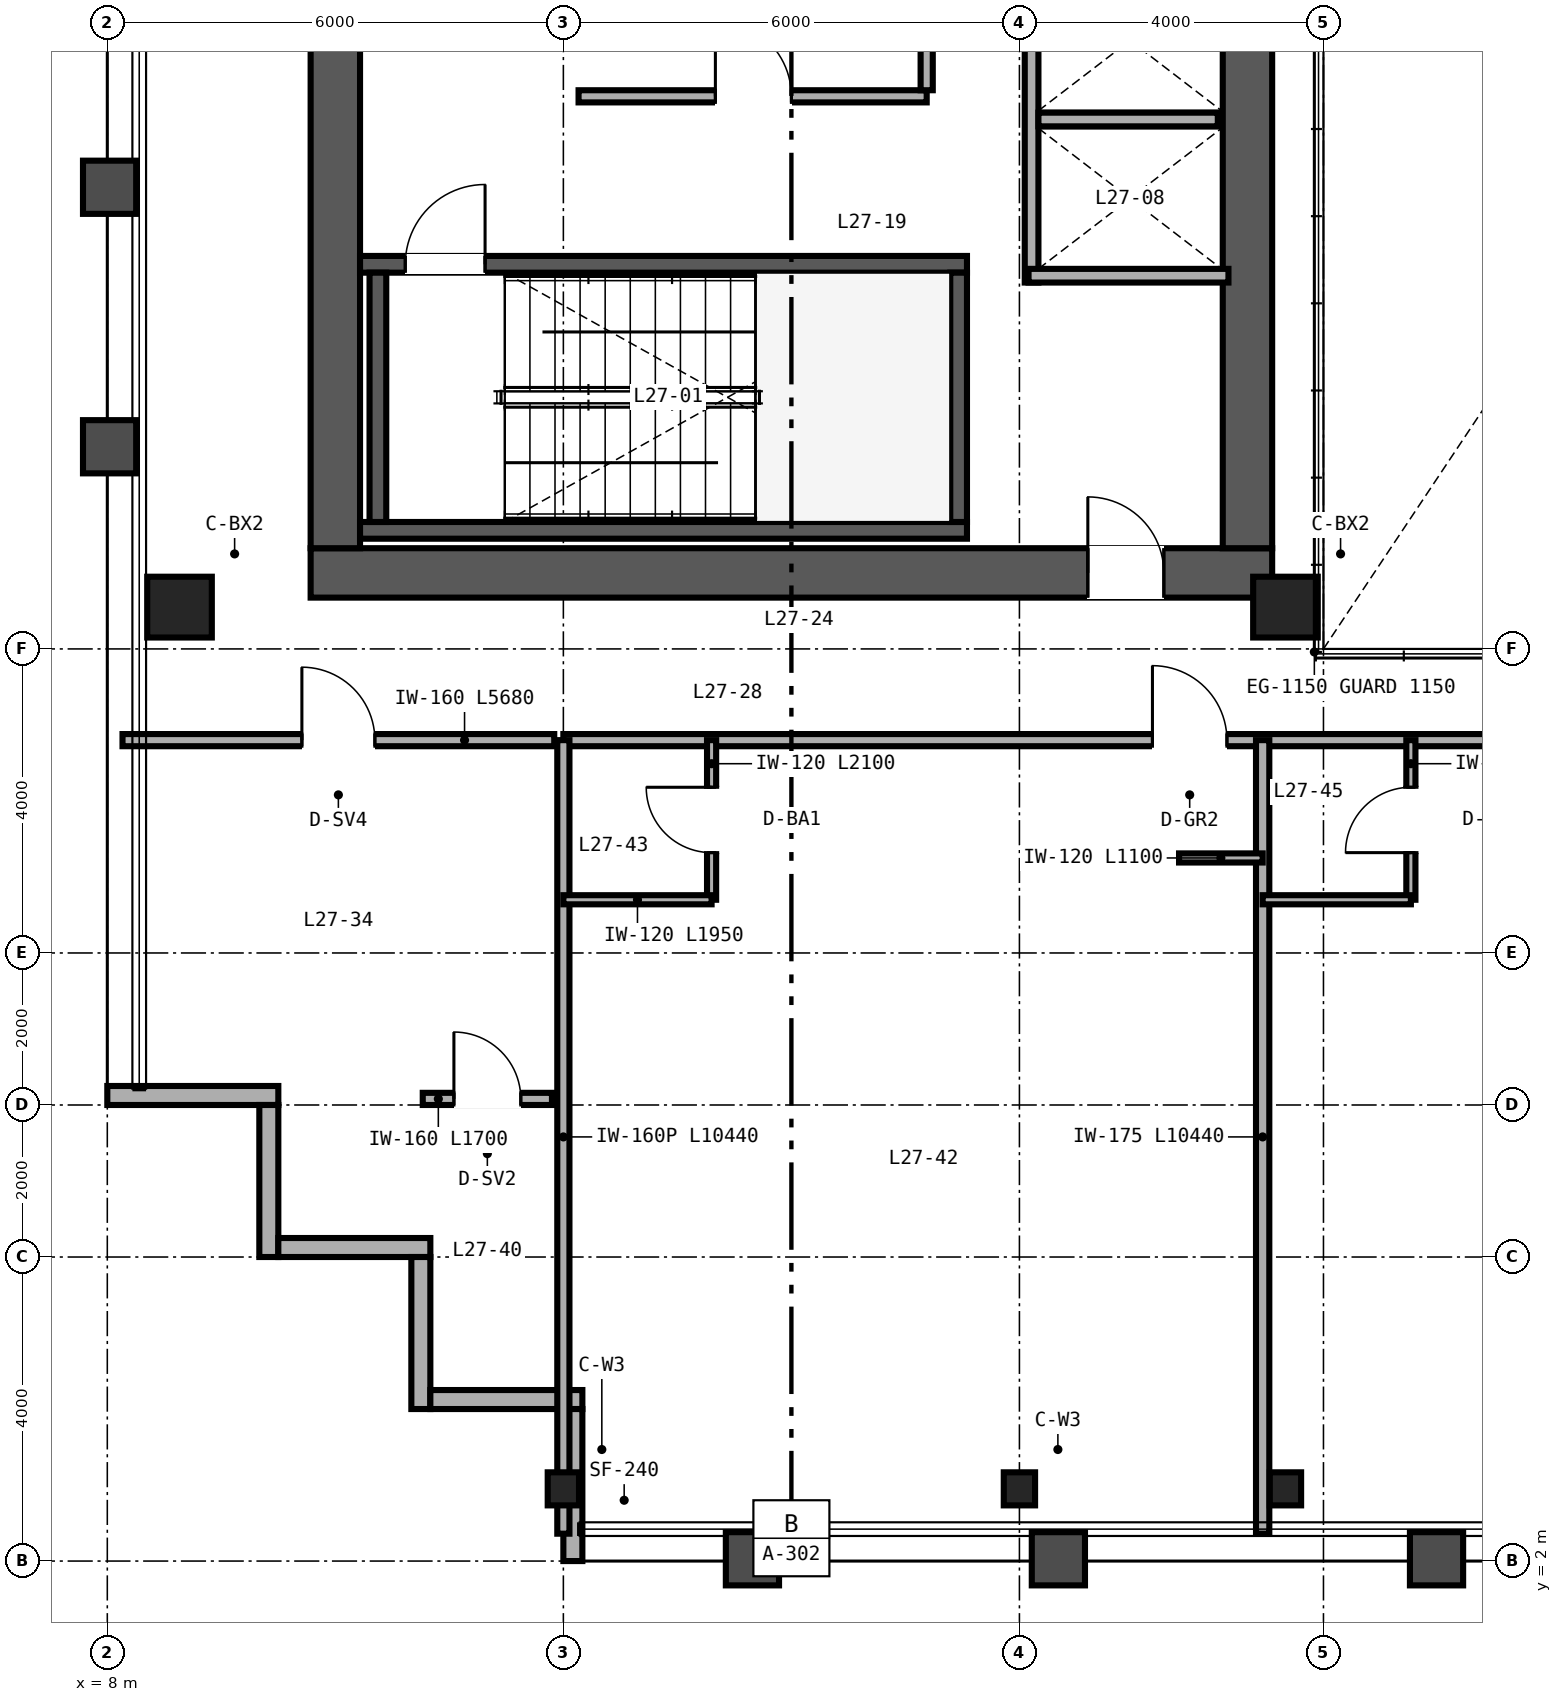
"""IFC4 building model, lengths in metres.
Left out: names, types, materials, properties, quantities, classifications, styles, units other than length and angle.
Written with IfcOpenShell. Run it as: python <this file> out.ifc"""

import sys

from ifc_helpers import new_model, si_unit, direction, frame, frame_2d, origin, origin_2d, place, context, subcontext, project, spatial, rectangle, hollow_rectangle, i_section, extrude, source, transform, mapped, element, fill, save


model = new_model("IFC4")
c1 = context("Model", 3, precision=1e-05, world=origin(), true_north=direction((0.0, 1.0)))
c2 = subcontext(c1, "Body", "Model", "MODEL_VIEW")
j1 = project(units=[si_unit("LENGTHUNIT", "METRE"), si_unit("PLANEANGLEUNIT", "RADIAN")], contexts=[c1])
p1 = place(None, origin())
s1 = spatial("IfcSite", under=j1, at=p1, CompositionType="ELEMENT")
p2 = place(p1, origin())
s2 = spatial("IfcBuilding", under=s1, at=p2, CompositionType="ELEMENT")
p3 = place(p2, frame((0.0, 0.0, 111.6)))
s3 = spatial("IfcBuildingStorey", under=s2, at=p3, CompositionType="ELEMENT", Elevation=111.6)
p4 = place(p3, frame((10.675, 15.0, 0.0), z_axis=(0.0, 0.0, 1.0), x_axis=(1.0, 0.0, 0.0)))
e1 = element("IfcWall", 1, at=p4, inside=s3, PredefinedType="SHEAR", context=c2, shape_type="SweptSolid", body=[
    extrude(rectangle(XDim=12.65, YDim=0.65, at=frame_2d((6.325, 0.0))), origin(), (0.0, 0.0, 1.0), 3.36),
])
p5 = place(p4, frame((10.225, 0.0, 0.0)))
e2 = element("IfcOpeningElement", 2, at=p5, cuts=e1, PredefinedType="OPENING", context=c2, shape_type="SweptSolid", body=[
    extrude(rectangle(XDim=1.0, YDim=2.15, at=frame_2d((0.5, 1.075))), frame((0.0, 0.335, 0.0), z_axis=(0.0, -1.0, 0.0), x_axis=(1.0, 0.0, 0.0)), (0.0, 0.0, 1.0), 0.67),
])
for number, where, z_axis, x_axis in (
    (3, (11.0, 15.325, 0.0), (0.0, 0.0, 1.0), (0.0, 1.0, 0.0)),
    (4, (23.0, 15.325, 0.0), (0.0, 0.0, 1.0), (0.0, 1.0, 0.0)),
):
    element("IfcWall", number, at=place(p3, frame(where, z_axis=z_axis, x_axis=x_axis)), inside=s3, PredefinedType="SHEAR", context=c2, shape_type="SweptSolid", body=[
        extrude(rectangle(XDim=21.35, YDim=0.65, at=frame_2d((10.675, 0.0))), origin(), (0.0, 0.0, 1.0), 3.36),
    ])
p6 = place(p3, frame((11.325, 15.56, 0.0), z_axis=(0.0, 0.0, 1.0), x_axis=(1.0, 0.0, 0.0)))
e5 = element("IfcWall", 5, at=p6, inside=s3, PredefinedType="SHEAR", context=c2, shape_type="SweptSolid", body=[
    extrude(rectangle(XDim=7.985, YDim=0.22, at=frame_2d((3.993, 0.0))), origin(), (0.0, 0.0, 1.0), 3.4),
])
p7 = place(p3, frame((11.325, 19.06, 0.0), z_axis=(0.0, 0.0, 1.0), x_axis=(1.0, 0.0, 0.0)))
e6 = element("IfcWall", 6, at=p7, inside=s3, PredefinedType="SHEAR", context=c2, shape_type="SweptSolid", body=[
    extrude(rectangle(XDim=7.985, YDim=0.22, at=frame_2d((3.993, 0.0))), origin(), (0.0, 0.0, 1.0), 3.4),
])
p8 = place(p7, frame((0.595, 0.0, 0.0)))
e7 = element("IfcOpeningElement", 7, at=p8, cuts=e6, PredefinedType="OPENING", context=c2, shape_type="SweptSolid", body=[
    extrude(rectangle(XDim=1.05, YDim=2.15, at=frame_2d((0.525, 1.075))), frame((0.0, 0.12, 0.0), z_axis=(0.0, -1.0, 0.0), x_axis=(1.0, 0.0, 0.0)), (0.0, 0.0, 1.0), 0.24),
])
for number, where, z_axis, x_axis in (
    (8, (11.56, 15.67, 0.0), (0.0, 0.0, 1.0), (0.0, 1.0, 0.0)),
    (9, (19.2, 15.67, 0.0), (0.0, 0.0, 1.0), (0.0, 1.0, 0.0)),
):
    element("IfcWall", number, at=place(p3, frame(where, z_axis=z_axis, x_axis=x_axis)), inside=s3, PredefinedType="SHEAR", context=c2, shape_type="SweptSolid", body=[
        extrude(rectangle(XDim=3.28, YDim=0.22, at=frame_2d((1.64, 0.0))), origin(), (0.0, 0.0, 1.0), 3.4),
    ])
m1 = source(origin(), c2, "Body", "SweptSolid", [
    extrude(hollow_rectangle(XDim=0.85, YDim=0.8, WallThickness=0.032, at=origin_2d()), origin(), (0.0, 0.0, 1.0), 3.36),
])
for number, where, z_axis, x_axis in (
    (10, (8.95, 14.55, 0.0), (0.0, 0.0, 1.0), (1.0, 0.0, 0.0)),
    (11, (23.5, 14.55, 0.0), (0.0, 0.0, 1.0), (1.0, 0.0, 0.0)),
):
    element("IfcColumn", number, at=place(p3, frame(where, z_axis=z_axis, x_axis=x_axis)), inside=s3, PredefinedType="COLUMN", context=c2, shape_type="MappedRepresentation", body=[
        mapped(m1, transform((0.0, 0.0, 0.0), scale=1.0)),
    ])
m2 = source(origin(), c2, "Body", "SweptSolid", [
    extrude(i_section(OverallWidth=0.412, OverallDepth=0.435, WebThickness=0.036, FlangeThickness=0.057, FilletRadius=0.025, at=origin_2d()), origin(), (0.0, 0.0, 1.0), 3.36),
])
for number, where, z_axis, x_axis in (
    (12, (14.0, 2.95, 0.0), (0.0, 0.0, 1.0), (1.0, 0.0, 0.0)),
    (13, (20.0, 2.95, 0.0), (0.0, 0.0, 1.0), (1.0, 0.0, 0.0)),
    (14, (23.5, 2.95, 0.0), (0.0, 0.0, 1.0), (1.0, 0.0, 0.0)),
):
    element("IfcColumn", number, at=place(p3, frame(where, z_axis=z_axis, x_axis=x_axis)), inside=s3, PredefinedType="COLUMN", context=c2, shape_type="MappedRepresentation", body=[
        mapped(m2, transform((0.0, 0.0, 0.0), scale=1.0)),
    ])
p9 = place(p3, frame((8.0, 8.125, 0.0), z_axis=(0.0, 0.0, 1.0), x_axis=(1.0, 0.0, 0.0)))
e15 = element("IfcWall", 15, at=p9, inside=s3, PredefinedType="SOLIDWALL", context=c2, shape_type="SweptSolid", body=[
    extrude(rectangle(XDim=2.25, YDim=0.25, at=frame_2d((1.125, 0.0))), origin(), (0.0, 0.0, 1.0), 3.36),
])
for number, where, z_axis, x_axis in (
    (16, (10.125, 8.0, 0.0), (0.0, 0.0, 1.0), (0.0, -1.0, 0.0)),
    (17, (10.25, 6.125, 0.0), (0.0, 0.0, 1.0), (1.0, 0.0, 0.0)),
    (18, (12.125, 6.0, 0.0), (0.0, 0.0, 1.0), (0.0, -1.0, 0.0)),
    (19, (12.25, 4.125, 0.0), (0.0, 0.0, 1.0), (1.0, 0.0, 0.0)),
):
    element("IfcWall", number, at=place(p3, frame(where, z_axis=z_axis, x_axis=x_axis)), inside=s3, PredefinedType="SOLIDWALL", context=c2, shape_type="SweptSolid", body=[
        extrude(rectangle(XDim=2.0, YDim=0.25, at=frame_2d((1.0, 0.0))), origin(), (0.0, 0.0, 1.0), 3.36),
    ])
p10 = place(p3, frame((14.125, 4.0, 0.0), z_axis=(0.0, 0.0, 1.0), x_axis=(0.0, -1.0, 0.0)))
e20 = element("IfcWall", 20, at=p10, inside=s3, PredefinedType="SOLIDWALL", context=c2, shape_type="SweptSolid", body=[
    extrude(rectangle(XDim=2.0, YDim=0.25, at=frame_2d((1.0, 0.0))), origin(), (0.0, 0.0, 1.0), 2.667),
])
p11 = place(p3, frame((20.16, 18.82, 0.0), z_axis=(0.0, 0.0, 1.0), x_axis=(0.0, 1.0, 0.0)))
e21 = element("IfcWall", 21, at=p11, inside=s3, PredefinedType="SOLIDWALL", context=c2, shape_type="SweptSolid", body=[
    extrude(rectangle(XDim=6.32, YDim=0.18, at=frame_2d((3.16, 0.0))), origin(), (0.0, 0.0, 1.0), 2.36),
])
p12 = place(p3, frame((20.12, 18.91, 0.0), z_axis=(0.0, 0.0, 1.0), x_axis=(1.0, 0.0, 0.0)))
e22 = element("IfcWall", 22, at=p12, inside=s3, PredefinedType="SOLIDWALL", context=c2, shape_type="SweptSolid", body=[
    extrude(rectangle(XDim=2.63, YDim=0.18, at=frame_2d((1.315, 0.0))), origin(), (0.0, 0.0, 1.0), 3.36),
])
p13 = place(p3, frame((20.25, 20.965, 0.0), z_axis=(0.0, 0.0, 1.0), x_axis=(1.0, 0.0, 0.0)))
e23 = element("IfcWall", 23, at=p13, inside=s3, PredefinedType="SOLIDWALL", context=c2, shape_type="SweptSolid", body=[
    extrude(rectangle(XDim=2.36, YDim=0.18, at=frame_2d((1.18, 0.0))), origin(), (0.0, 0.0, 1.0), 2.36),
])
p14 = place(p3, frame((14.2, 21.27, 0.0), z_axis=(0.0, 0.0, 1.0), x_axis=(1.0, 0.0, 0.0)))
e24 = element("IfcWall", 24, at=p14, inside=s3, PredefinedType="PARTITIONING", context=c2, shape_type="SweptSolid", body=[
    extrude(rectangle(XDim=4.58, YDim=0.16, at=frame_2d((2.29, 0.0))), origin(), (0.0, 0.0, 1.0), 3.36),
])
p15 = place(p14, frame((1.8, 0.0, 0.0)))
e25 = element("IfcOpeningElement", 25, at=p15, cuts=e24, PredefinedType="OPENING", context=c2, shape_type="SweptSolid", body=[
    extrude(rectangle(XDim=1.0, YDim=2.15, at=frame_2d((0.5, 1.075))), frame((0.0, 0.09, 0.0), z_axis=(0.0, -1.0, 0.0), x_axis=(1.0, 0.0, 0.0)), (0.0, 0.0, 1.0), 0.18),
])
p16 = place(p3, frame((18.78, 21.35, 0.0), z_axis=(0.0, 0.0, 1.0), x_axis=(0.0, 1.0, 0.0)))
e26 = element("IfcWall", 26, at=p16, inside=s3, PredefinedType="PARTITIONING", context=c2, shape_type="SweptSolid", body=[
    extrude(rectangle(XDim=3.81, YDim=0.16, at=frame_2d((1.905, 0.0))), origin(), (0.0, 0.0, 1.0), 3.36),
])
p17 = place(p3, frame((8.2, 12.8, 0.0), z_axis=(0.0, 0.0, 1.0), x_axis=(1.0, 0.0, 0.0)))
e27 = element("IfcWall", 27, at=p17, inside=s3, PredefinedType="PARTITIONING", context=c2, shape_type="SweptSolid", body=[
    extrude(rectangle(XDim=5.68, YDim=0.16, at=frame_2d((2.84, 0.0))), origin(), (0.0, 0.0, 1.0), 3.36),
])
p18 = place(p17, frame((2.36, 0.0, 0.0)))
e28 = element("IfcOpeningElement", 28, at=p18, cuts=e27, PredefinedType="OPENING", context=c2, shape_type="SweptSolid", body=[
    extrude(rectangle(XDim=0.96, YDim=2.15, at=frame_2d((0.48, 1.075))), frame((0.0, 0.09, 0.0), z_axis=(0.0, -1.0, 0.0), x_axis=(1.0, 0.0, 0.0)), (0.0, 0.0, 1.0), 0.18),
])
p19 = place(p3, frame((12.15, 8.08, 0.0), z_axis=(0.0, 0.0, 1.0), x_axis=(1.0, 0.0, 0.0)))
e29 = element("IfcWall", 29, at=p19, inside=s3, PredefinedType="PARTITIONING", context=c2, shape_type="SweptSolid", body=[
    extrude(rectangle(XDim=1.7, YDim=0.16, at=frame_2d((0.85, 0.0))), origin(), (0.0, 0.0, 1.0), 3.36),
])
p20 = place(p19, frame((0.41, 0.0, 0.0)))
e30 = element("IfcOpeningElement", 30, at=p20, cuts=e29, PredefinedType="OPENING", context=c2, shape_type="SweptSolid", body=[
    extrude(rectangle(XDim=0.88, YDim=2.15, at=frame_2d((0.44, 1.075))), frame((0.0, 0.09, 0.0), z_axis=(0.0, -1.0, 0.0), x_axis=(1.0, 0.0, 0.0)), (0.0, 0.0, 1.0), 0.18),
])
p21 = place(p3, frame((14.0, 12.8, 0.0), z_axis=(0.0, 0.0, 1.0), x_axis=(1.0, 0.0, 0.0)))
e31 = element("IfcWall", 31, at=p21, inside=s3, PredefinedType="PARTITIONING", context=c2, shape_type="SweptSolid", body=[
    extrude(rectangle(XDim=36.0, YDim=0.16, at=frame_2d((18.0, 0.0))), origin(), (0.0, 0.0, 1.0), 2.581),
])
p22 = place(p21, frame((7.75, 0.0, 0.0)))
e32 = element("IfcOpeningElement", 32, at=p22, cuts=e31, PredefinedType="OPENING", context=c2, shape_type="SweptSolid", body=[
    extrude(rectangle(XDim=0.98, YDim=2.2, at=frame_2d((0.49, 1.1))), frame((0.0, 0.09, 0.0), z_axis=(0.0, -1.0, 0.0), x_axis=(1.0, 0.0, 0.0)), (0.0, 0.0, 1.0), 0.18),
])
p23 = place(p21, frame((16.9, 0.0, 0.0)))
e33 = element("IfcOpeningElement", 33, at=p23, cuts=e31, PredefinedType="OPENING", context=c2, shape_type="SweptSolid", body=[
    extrude(rectangle(XDim=0.98, YDim=2.2, at=frame_2d((0.49, 1.1))), frame((0.0, 0.09, 0.0), z_axis=(0.0, -1.0, 0.0), x_axis=(1.0, 0.0, 0.0)), (0.0, 0.0, 1.0), 0.18),
])
p24 = place(p21, frame((24.65, 0.0, 0.0)))
e34 = element("IfcOpeningElement", 34, at=p24, cuts=e31, PredefinedType="OPENING", context=c2, shape_type="SweptSolid", body=[
    extrude(rectangle(XDim=0.98, YDim=2.2, at=frame_2d((0.49, 1.1))), frame((0.0, 0.09, 0.0), z_axis=(0.0, -1.0, 0.0), x_axis=(1.0, 0.0, 0.0)), (0.0, 0.0, 1.0), 0.18),
])
p25 = place(p21, frame((34.7, 0.0, 0.0)))
e35 = element("IfcOpeningElement", 35, at=p25, cuts=e31, PredefinedType="OPENING", context=c2, shape_type="SweptSolid", body=[
    extrude(rectangle(XDim=0.98, YDim=2.2, at=frame_2d((0.49, 1.1))), frame((0.0, 0.09, 0.0), z_axis=(0.0, -1.0, 0.0), x_axis=(1.0, 0.0, 0.0)), (0.0, 0.0, 1.0), 0.18),
])
p26 = place(p3, frame((14.0, 2.36, 0.0), z_axis=(0.0, 0.0, 1.0), x_axis=(0.0, 1.0, 0.0)))
e36 = element("IfcWall", 36, at=p26, inside=s3, PredefinedType="PARTITIONING", context=c2, shape_type="SweptSolid", body=[
    extrude(rectangle(XDim=10.44, YDim=0.16, at=frame_2d((5.22, 0.0))), origin(), (0.0, 0.0, 1.0), 2.667),
])
p27 = place(p3, frame((23.2, 2.36, 0.0), z_axis=(0.0, 0.0, 1.0), x_axis=(0.0, 1.0, 0.0)))
e37 = element("IfcWall", 37, at=p27, inside=s3, PredefinedType="PARTITIONING", context=c2, shape_type="SweptSolid", body=[
    extrude(rectangle(XDim=10.44, YDim=0.175, at=frame_2d((5.22, 0.0))), origin(), (0.0, 0.0, 1.0), 2.433),
])
p28 = place(p3, frame((15.95, 10.7, 0.0), z_axis=(0.0, 0.0, 1.0), x_axis=(0.0, 1.0, 0.0)))
e38 = element("IfcWall", 38, at=p28, inside=s3, PredefinedType="PARTITIONING", context=c2, shape_type="SweptSolid", body=[
    extrude(rectangle(XDim=2.1, YDim=0.12, at=frame_2d((1.05, 0.0))), origin(), (0.0, 0.0, 1.0), 3.36),
])
p29 = place(p28, frame((0.62, 0.0, 0.0)))
e39 = element("IfcOpeningElement", 39, at=p29, cuts=e38, PredefinedType="OPENING", context=c2, shape_type="SweptSolid", body=[
    extrude(rectangle(XDim=0.86, YDim=2.1, at=frame_2d((0.43, 1.05))), frame((0.0, 0.07, 0.0), z_axis=(0.0, -1.0, 0.0), x_axis=(1.0, 0.0, 0.0)), (0.0, 0.0, 1.0), 0.14),
])
p30 = place(p3, frame((14.0, 10.7, 0.0), z_axis=(0.0, 0.0, 1.0), x_axis=(1.0, 0.0, 0.0)))
e40 = element("IfcWall", 40, at=p30, inside=s3, PredefinedType="PARTITIONING", context=c2, shape_type="SweptSolid", body=[
    extrude(rectangle(XDim=1.95, YDim=0.12, at=frame_2d((0.975, 0.0))), origin(), (0.0, 0.0, 1.0), 3.36),
])
p31 = place(p3, frame((22.1, 11.25, 0.0), z_axis=(0.0, 0.0, 1.0), x_axis=(1.0, 0.0, 0.0)))
e41 = element("IfcWall", 41, at=p31, inside=s3, PredefinedType="PARTITIONING", context=c2, shape_type="SweptSolid", body=[
    extrude(rectangle(XDim=1.1, YDim=0.12, at=frame_2d((0.55, 0.0))), origin(), (0.0, 0.0, 1.0), 3.36),
])
p32 = place(p3, frame((25.15, 10.7, 0.0), z_axis=(0.0, 0.0, 1.0), x_axis=(0.0, 1.0, 0.0)))
e42 = element("IfcWall", 42, at=p32, inside=s3, PredefinedType="PARTITIONING", context=c2, shape_type="SweptSolid", body=[
    extrude(rectangle(XDim=2.1, YDim=0.12, at=frame_2d((1.05, 0.0))), origin(), (0.0, 0.0, 1.0), 3.36),
])
p33 = place(p32, frame((0.62, 0.0, 0.0)))
e43 = element("IfcOpeningElement", 43, at=p33, cuts=e42, PredefinedType="OPENING", context=c2, shape_type="SweptSolid", body=[
    extrude(rectangle(XDim=0.86, YDim=2.1, at=frame_2d((0.43, 1.05))), frame((0.0, 0.07, 0.0), z_axis=(0.0, -1.0, 0.0), x_axis=(1.0, 0.0, 0.0)), (0.0, 0.0, 1.0), 0.14),
])
p34 = place(p3, frame((23.2, 10.7, 0.0), z_axis=(0.0, 0.0, 1.0), x_axis=(1.0, 0.0, 0.0)))
e44 = element("IfcWall", 44, at=p34, inside=s3, PredefinedType="PARTITIONING", context=c2, shape_type="SweptSolid", body=[
    extrude(rectangle(XDim=1.95, YDim=0.12, at=frame_2d((0.975, 0.0))), origin(), (0.0, 0.0, 1.0), 2.581),
])
m3 = source(origin(), c2, "Body", "SweptSolid", [
    extrude(rectangle(XDim=1.05, YDim=2.15, at=frame_2d((0.525, 1.075))), frame((0.0, 0.025, 0.0), z_axis=(0.0, -1.0, 0.0), x_axis=(1.0, 0.0, 0.0)), (0.0, 0.0, 1.0), 0.05),
])
p35 = place(p8, origin())
e45 = element("IfcDoor", 45, at=p35, inside=s3, OperationType="SINGLE_SWING_RIGHT", PredefinedType="DOOR", context=c2, shape_type="MappedRepresentation", body=[
    mapped(m3, transform((0.0, 0.0, 0.0), scale=1.0)),
])
fill(e7, e45)
m4 = source(origin(), c2, "Body", "SweptSolid", [
    extrude(rectangle(XDim=1.0, YDim=2.15, at=frame_2d((0.5, 1.075))), frame((0.0, 0.025, 0.0), z_axis=(0.0, -1.0, 0.0), x_axis=(1.0, 0.0, 0.0)), (0.0, 0.0, 1.0), 0.05),
])
p36 = place(p15, origin())
e46 = element("IfcDoor", 46, at=p36, inside=s3, OperationType="SINGLE_SWING_LEFT", PredefinedType="DOOR", context=c2, shape_type="MappedRepresentation", body=[
    mapped(m4, transform((0.0, 0.0, 0.0), scale=1.0)),
])
fill(e25, e46)
p37 = place(p5, origin())
e47 = element("IfcDoor", 47, at=p37, inside=s3, OperationType="SINGLE_SWING_LEFT", PredefinedType="DOOR", context=c2, shape_type="MappedRepresentation", body=[
    mapped(m4, transform((0.0, 0.0, 0.0), scale=1.0)),
])
fill(e2, e47)
m5 = source(origin(), c2, "Body", "SweptSolid", [
    extrude(rectangle(XDim=0.96, YDim=2.15, at=frame_2d((0.48, 1.075))), frame((0.0, 0.025, 0.0), z_axis=(0.0, -1.0, 0.0), x_axis=(1.0, 0.0, 0.0)), (0.0, 0.0, 1.0), 0.05),
])
p38 = place(p18, origin())
e48 = element("IfcDoor", 48, at=p38, inside=s3, OperationType="SINGLE_SWING_LEFT", PredefinedType="DOOR", context=c2, shape_type="MappedRepresentation", body=[
    mapped(m5, transform((0.0, 0.0, 0.0), scale=1.0)),
])
fill(e28, e48)
m6 = source(origin(), c2, "Body", "SweptSolid", [
    extrude(rectangle(XDim=0.88, YDim=2.15, at=frame_2d((0.44, 1.075))), frame((0.0, 0.025, 0.0), z_axis=(0.0, -1.0, 0.0), x_axis=(1.0, 0.0, 0.0)), (0.0, 0.0, 1.0), 0.05),
])
p39 = place(p20, origin())
e49 = element("IfcDoor", 49, at=p39, inside=s3, OperationType="SINGLE_SWING_LEFT", PredefinedType="DOOR", context=c2, shape_type="MappedRepresentation", body=[
    mapped(m6, transform((0.0, 0.0, 0.0), scale=1.0)),
])
fill(e30, e49)
m7 = source(origin(), c2, "Body", "SweptSolid", [
    extrude(rectangle(XDim=0.86, YDim=2.1, at=frame_2d((0.43, 1.05))), frame((0.0, 0.025, 0.0), z_axis=(0.0, -1.0, 0.0), x_axis=(1.0, 0.0, 0.0)), (0.0, 0.0, 1.0), 0.05),
])
p40 = place(p29, origin())
e50 = element("IfcDoor", 50, at=p40, inside=s3, OperationType="SINGLE_SWING_RIGHT", PredefinedType="DOOR", context=c2, shape_type="MappedRepresentation", body=[
    mapped(m7, transform((0.0, 0.0, 0.0), scale=1.0)),
])
fill(e39, e50)
p41 = place(p33, origin())
e51 = element("IfcDoor", 51, at=p41, inside=s3, OperationType="SINGLE_SWING_LEFT", PredefinedType="DOOR", context=c2, shape_type="MappedRepresentation", body=[
    mapped(m7, transform((0.0, 0.0, 0.0), scale=1.0)),
])
fill(e43, e51)
m8 = source(origin(), c2, "Body", "SweptSolid", [
    extrude(rectangle(XDim=0.98, YDim=2.2, at=frame_2d((0.49, 1.1))), frame((0.0, 0.025, 0.0), z_axis=(0.0, -1.0, 0.0), x_axis=(1.0, 0.0, 0.0)), (0.0, 0.0, 1.0), 0.05),
])
p42 = place(p22, origin())
e52 = element("IfcDoor", 52, at=p42, inside=s3, OperationType="SINGLE_SWING_LEFT", PredefinedType="DOOR", context=c2, shape_type="MappedRepresentation", body=[
    mapped(m8, transform((0.0, 0.0, 0.0), scale=1.0)),
])
fill(e32, e52)
save(model, sys.argv[1])
